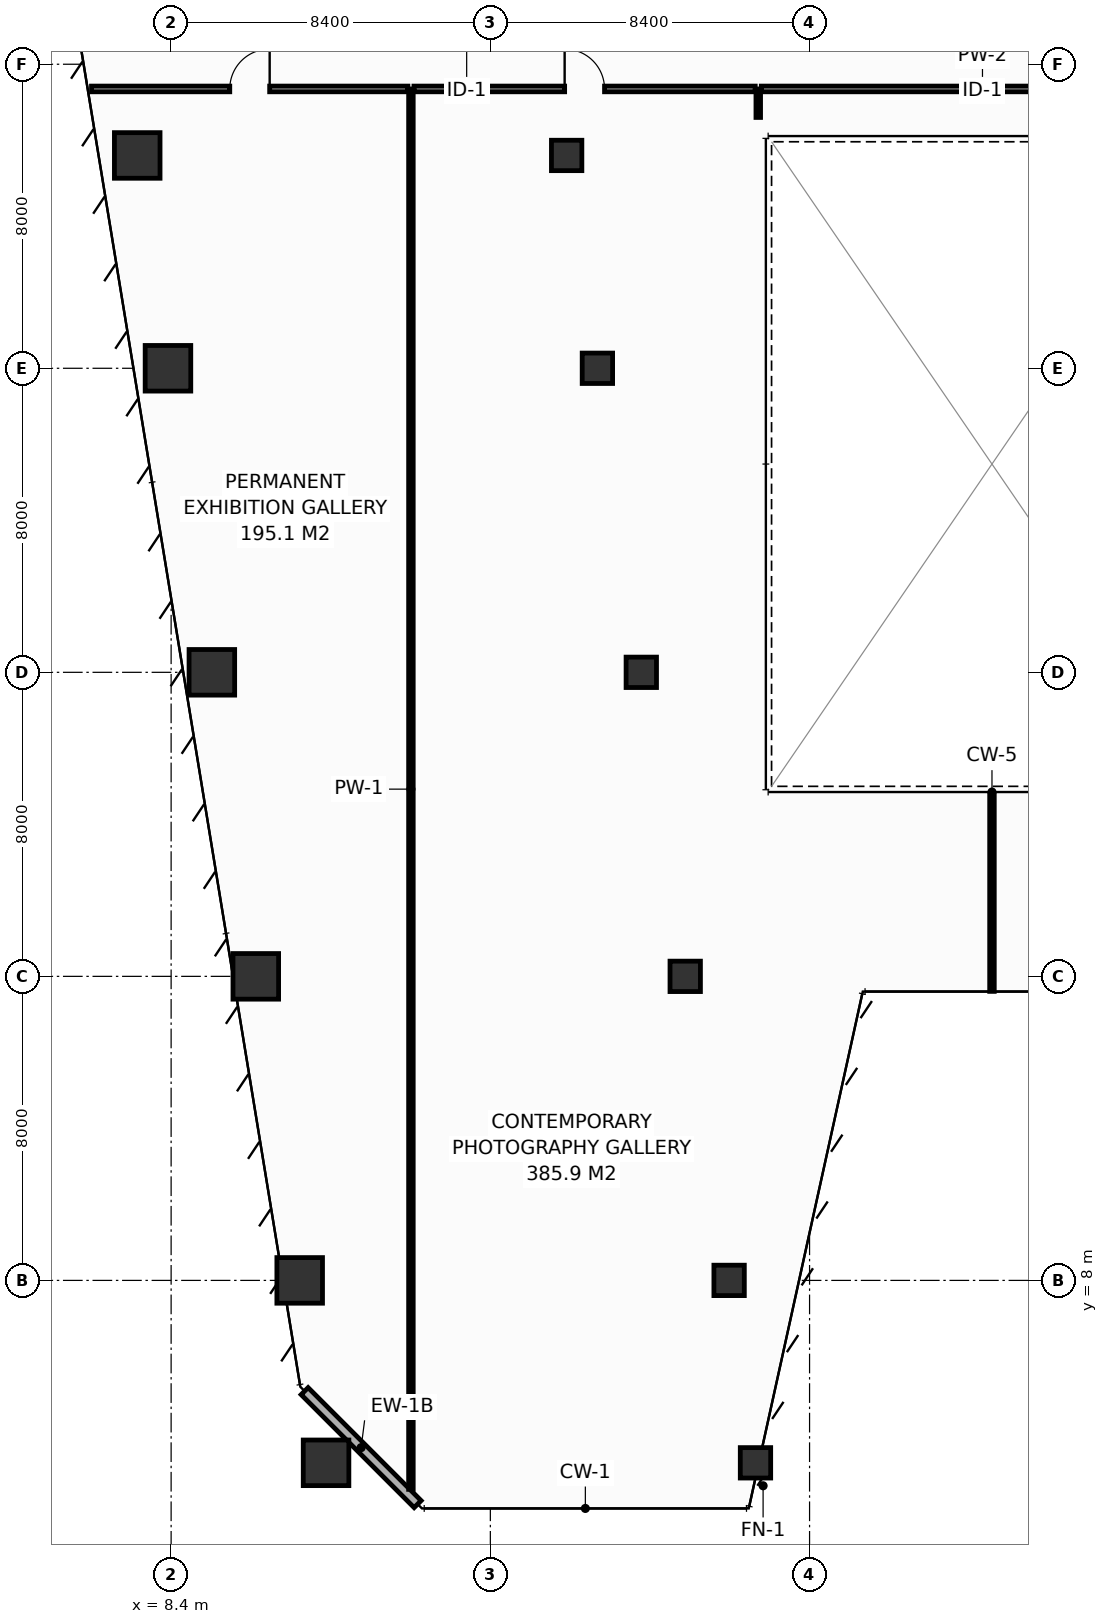
"""IFC4 building model, lengths in metres.
Left out: names, types, materials, properties, quantities, classifications, styles, units other than length and angle.
Written with IfcOpenShell. Run it as: python <this file> out.ifc"""

import sys

from ifc_helpers import new_model, si_unit, direction, frame, frame_2d, origin, origin_2d, place, context, subcontext, project, spatial, rectangle, hollow_rectangle, extrude, element, fill, save


model = new_model("IFC4")
c1 = context("Model", 3, precision=1e-05, world=origin(), true_north=direction((0.0, 1.0)))
c2 = subcontext(c1, "Body", "Model", "MODEL_VIEW")
j1 = project(units=[si_unit("LENGTHUNIT", "METRE"), si_unit("PLANEANGLEUNIT", "RADIAN")], contexts=[c1])
p1 = place(None, origin())
s1 = spatial("IfcSite", under=j1, at=p1, CompositionType="ELEMENT")
p2 = place(p1, origin())
s2 = spatial("IfcBuilding", under=s1, at=p2, CompositionType="ELEMENT")
p3 = place(p2, frame((0.0, 0.0, 56.0)))
s3 = spatial("IfcBuildingStorey", under=s2, at=p3, CompositionType="ELEMENT", Elevation=56.0)
p4 = place(p3, frame((12.477, 3.2, 0.0), z_axis=(0.0, 0.0, 1.0), x_axis=(1.0, 0.0, 0.0)))
e1 = element("IfcColumn", 1, at=p4, inside=s3, PredefinedType="COLUMN", context=c2, shape_type="SweptSolid", body=[
    extrude(hollow_rectangle(XDim=1.2, YDim=1.2, WallThickness=0.055, at=origin_2d()), origin(), (0.0, 0.0, 1.0), 4.4),
])
p5 = place(p3, frame((23.777, 3.2, 0.0), z_axis=(0.0, 0.0, 1.0), x_axis=(1.0, 0.0, 0.0)))
e2 = element("IfcColumn", 2, at=p5, inside=s3, PredefinedType="COLUMN", context=c2, shape_type="SweptSolid", body=[
    extrude(hollow_rectangle(XDim=0.8, YDim=0.8, WallThickness=0.036, at=origin_2d()), origin(), (0.0, 0.0, 1.0), 4.4),
])
p6 = place(p3, frame((11.783, 8.0, 0.0), z_axis=(0.0, 0.0, 1.0), x_axis=(1.0, 0.0, 0.0)))
e3 = element("IfcColumn", 3, at=p6, inside=s3, PredefinedType="COLUMN", context=c2, shape_type="SweptSolid", body=[
    extrude(hollow_rectangle(XDim=1.2, YDim=1.2, WallThickness=0.055, at=origin_2d()), origin(), (0.0, 0.0, 1.0), 4.4),
])
p7 = place(p3, frame((23.083, 8.0, 0.0), z_axis=(0.0, 0.0, 1.0), x_axis=(1.0, 0.0, 0.0)))
e4 = element("IfcColumn", 4, at=p7, inside=s3, PredefinedType="COLUMN", context=c2, shape_type="SweptSolid", body=[
    extrude(hollow_rectangle(XDim=0.8, YDim=0.8, WallThickness=0.036, at=origin_2d()), origin(), (0.0, 0.0, 1.0), 4.4),
])
p8 = place(p3, frame((10.628, 16.0, 0.0), z_axis=(0.0, 0.0, 1.0), x_axis=(1.0, 0.0, 0.0)))
e5 = element("IfcColumn", 5, at=p8, inside=s3, PredefinedType="COLUMN", context=c2, shape_type="SweptSolid", body=[
    extrude(hollow_rectangle(XDim=1.2, YDim=1.2, WallThickness=0.055, at=origin_2d()), origin(), (0.0, 0.0, 1.0), 4.4),
])
p9 = place(p3, frame((21.928, 16.0, 0.0), z_axis=(0.0, 0.0, 1.0), x_axis=(1.0, 0.0, 0.0)))
e6 = element("IfcColumn", 6, at=p9, inside=s3, PredefinedType="COLUMN", context=c2, shape_type="SweptSolid", body=[
    extrude(hollow_rectangle(XDim=0.8, YDim=0.8, WallThickness=0.036, at=origin_2d()), origin(), (0.0, 0.0, 1.0), 4.4),
])
p10 = place(p3, frame((9.472, 24.0, 0.0), z_axis=(0.0, 0.0, 1.0), x_axis=(1.0, 0.0, 0.0)))
e7 = element("IfcColumn", 7, at=p10, inside=s3, PredefinedType="COLUMN", context=c2, shape_type="SweptSolid", body=[
    extrude(hollow_rectangle(XDim=1.2, YDim=1.2, WallThickness=0.055, at=origin_2d()), origin(), (0.0, 0.0, 1.0), 4.4),
])
p11 = place(p3, frame((20.772, 24.0, 0.0), z_axis=(0.0, 0.0, 1.0), x_axis=(1.0, 0.0, 0.0)))
e8 = element("IfcColumn", 8, at=p11, inside=s3, PredefinedType="COLUMN", context=c2, shape_type="SweptSolid", body=[
    extrude(hollow_rectangle(XDim=0.8, YDim=0.8, WallThickness=0.036, at=origin_2d()), origin(), (0.0, 0.0, 1.0), 4.4),
])
p12 = place(p3, frame((8.317, 32.0, 0.0), z_axis=(0.0, 0.0, 1.0), x_axis=(1.0, 0.0, 0.0)))
e9 = element("IfcColumn", 9, at=p12, inside=s3, PredefinedType="COLUMN", context=c2, shape_type="SweptSolid", body=[
    extrude(hollow_rectangle(XDim=1.2, YDim=1.2, WallThickness=0.055, at=origin_2d()), origin(), (0.0, 0.0, 1.0), 4.4),
])
p13 = place(p3, frame((19.617, 32.0, 0.0), z_axis=(0.0, 0.0, 1.0), x_axis=(1.0, 0.0, 0.0)))
e10 = element("IfcColumn", 10, at=p13, inside=s3, PredefinedType="COLUMN", context=c2, shape_type="SweptSolid", body=[
    extrude(hollow_rectangle(XDim=0.8, YDim=0.8, WallThickness=0.036, at=origin_2d()), origin(), (0.0, 0.0, 1.0), 4.4),
])
p14 = place(p3, frame((7.508, 37.6, 0.0), z_axis=(0.0, 0.0, 1.0), x_axis=(1.0, 0.0, 0.0)))
e11 = element("IfcColumn", 11, at=p14, inside=s3, PredefinedType="COLUMN", context=c2, shape_type="SweptSolid", body=[
    extrude(hollow_rectangle(XDim=1.2, YDim=1.2, WallThickness=0.055, at=origin_2d()), origin(), (0.0, 0.0, 1.0), 4.4),
])
p15 = place(p3, frame((18.808, 37.6, 0.0), z_axis=(0.0, 0.0, 1.0), x_axis=(1.0, 0.0, 0.0)))
e12 = element("IfcColumn", 12, at=p15, inside=s3, PredefinedType="COLUMN", context=c2, shape_type="SweptSolid", body=[
    extrude(hollow_rectangle(XDim=0.8, YDim=0.8, WallThickness=0.036, at=origin_2d()), origin(), (0.0, 0.0, 1.0), 4.4),
])
p16 = place(p3, frame((11.913, 5.087, 0.0), z_axis=(0.0, 0.0, 1.0), x_axis=(0.707106781187, -0.707106781187, 0.0)))
e13 = element("IfcWall", 13, at=p16, inside=s3, PredefinedType="STANDARD", context=c2, shape_type="SweptSolid", body=[
    extrude(rectangle(XDim=4.206, YDim=0.26, at=frame_2d((2.103, 0.0))), origin(), (0.0, 0.0, 1.0), 4.15),
])
p17 = place(p3, frame((14.71, 2.502, 0.0), z_axis=(0.0, 0.0, 1.0), x_axis=(0.0, 1.0, 0.0)))
e14 = element("IfcWall", 14, at=p17, inside=s3, PredefinedType="PARTITIONING", context=c2, shape_type="SweptSolid", body=[
    extrude(rectangle(XDim=36.848, YDim=0.12, at=frame_2d((18.424, 0.0))), origin(), (0.0, 0.0, 1.0), 3.335),
])
p18 = place(p3, frame((23.85, 38.6, 0.0), z_axis=(0.0, 0.0, 1.0), x_axis=(0.0, 1.0, 0.0)))
e15 = element("IfcWall", 15, at=p18, inside=s3, PredefinedType="PARTITIONING", context=c2, shape_type="SweptSolid", body=[
    extrude(rectangle(XDim=0.75, YDim=0.12, at=frame_2d((0.375, 0.0))), origin(), (0.0, 0.0, 1.0), 3.335),
])
p19 = place(p3, frame((30.0, 15.605, 0.0), z_axis=(0.0, 0.0, 1.0), x_axis=(0.0, 1.0, 0.0)))
e16 = element("IfcWall", 16, at=p19, inside=s3, PredefinedType="PARTITIONING", context=c2, shape_type="SweptSolid", body=[
    extrude(rectangle(XDim=5.175, YDim=0.12, at=frame_2d((2.587, 0.0))), origin(), (0.0, 0.0, 1.0), 4.15),
])
p20 = place(p3, frame((6.305, 39.35, 0.0), z_axis=(0.0, 0.0, 1.0), x_axis=(1.0, 0.0, 0.0)))
e17 = element("IfcWall", 17, at=p20, inside=s3, PredefinedType="PARTITIONING", context=c2, shape_type="SweptSolid", body=[
    extrude(rectangle(XDim=8.325, YDim=0.15, at=frame_2d((4.163, 0.0))), origin(), (0.0, 0.0, 1.0), 3.635),
])
p21 = place(p20, frame((3.638, 0.0, 0.0)))
e18 = element("IfcOpeningElement", 18, at=p21, cuts=e17, PredefinedType="OPENING", context=c2, shape_type="SweptSolid", body=[
    extrude(rectangle(XDim=1.05, YDim=2.15, at=frame_2d((0.525, 1.075))), frame((0.0, 0.085, 0.0), z_axis=(0.0, -1.0, 0.0), x_axis=(1.0, 0.0, 0.0)), (0.0, 0.0, 1.0), 0.17),
])
p22 = place(p3, frame((14.79, 39.35, 0.0), z_axis=(0.0, 0.0, 1.0), x_axis=(1.0, 0.0, 0.0)))
e19 = element("IfcWall", 19, at=p22, inside=s3, PredefinedType="PARTITIONING", context=c2, shape_type="SweptSolid", body=[
    extrude(rectangle(XDim=8.98, YDim=0.15, at=frame_2d((4.49, 0.0))), origin(), (0.0, 0.0, 1.0), 3.335),
])
p23 = place(p22, frame((3.965, 0.0, 0.0)))
e20 = element("IfcOpeningElement", 20, at=p23, cuts=e19, PredefinedType="OPENING", context=c2, shape_type="SweptSolid", body=[
    extrude(rectangle(XDim=1.05, YDim=2.15, at=frame_2d((0.525, 1.075))), frame((0.0, 0.085, 0.0), z_axis=(0.0, -1.0, 0.0), x_axis=(1.0, 0.0, 0.0)), (0.0, 0.0, 1.0), 0.17),
])
p24 = place(p3, frame((23.93, 39.35, 0.0), z_axis=(0.0, 0.0, 1.0), x_axis=(1.0, 0.0, 0.0)))
e21 = element("IfcWall", 21, at=p24, inside=s3, PredefinedType="PARTITIONING", context=c2, shape_type="SweptSolid", body=[
    extrude(rectangle(XDim=12.14, YDim=0.15, at=frame_2d((6.07, 0.0))), origin(), (0.0, 0.0, 1.0), 4.15),
])
p25 = place(p21, origin())
e22 = element("IfcDoor", 22, at=p25, inside=s3, OperationType="SINGLE_SWING_RIGHT", PredefinedType="DOOR", context=c2, shape_type="SweptSolid", body=[
    extrude(rectangle(XDim=1.05, YDim=2.15, at=frame_2d((0.525, 1.075))), frame((0.0, 0.025, 0.0), z_axis=(0.0, -1.0, 0.0), x_axis=(1.0, 0.0, 0.0)), (0.0, 0.0, 1.0), 0.05),
])
fill(e18, e22)
p26 = place(p23, origin())
e23 = element("IfcDoor", 23, at=p26, inside=s3, OperationType="SINGLE_SWING_LEFT", PredefinedType="DOOR", context=c2, shape_type="SweptSolid", body=[
    extrude(rectangle(XDim=1.05, YDim=2.15, at=frame_2d((0.525, 1.075))), frame((0.0, 0.025, 0.0), z_axis=(0.0, -1.0, 0.0), x_axis=(1.0, 0.0, 0.0)), (0.0, 0.0, 1.0), 0.05),
])
fill(e20, e23)
save(model, sys.argv[1])
